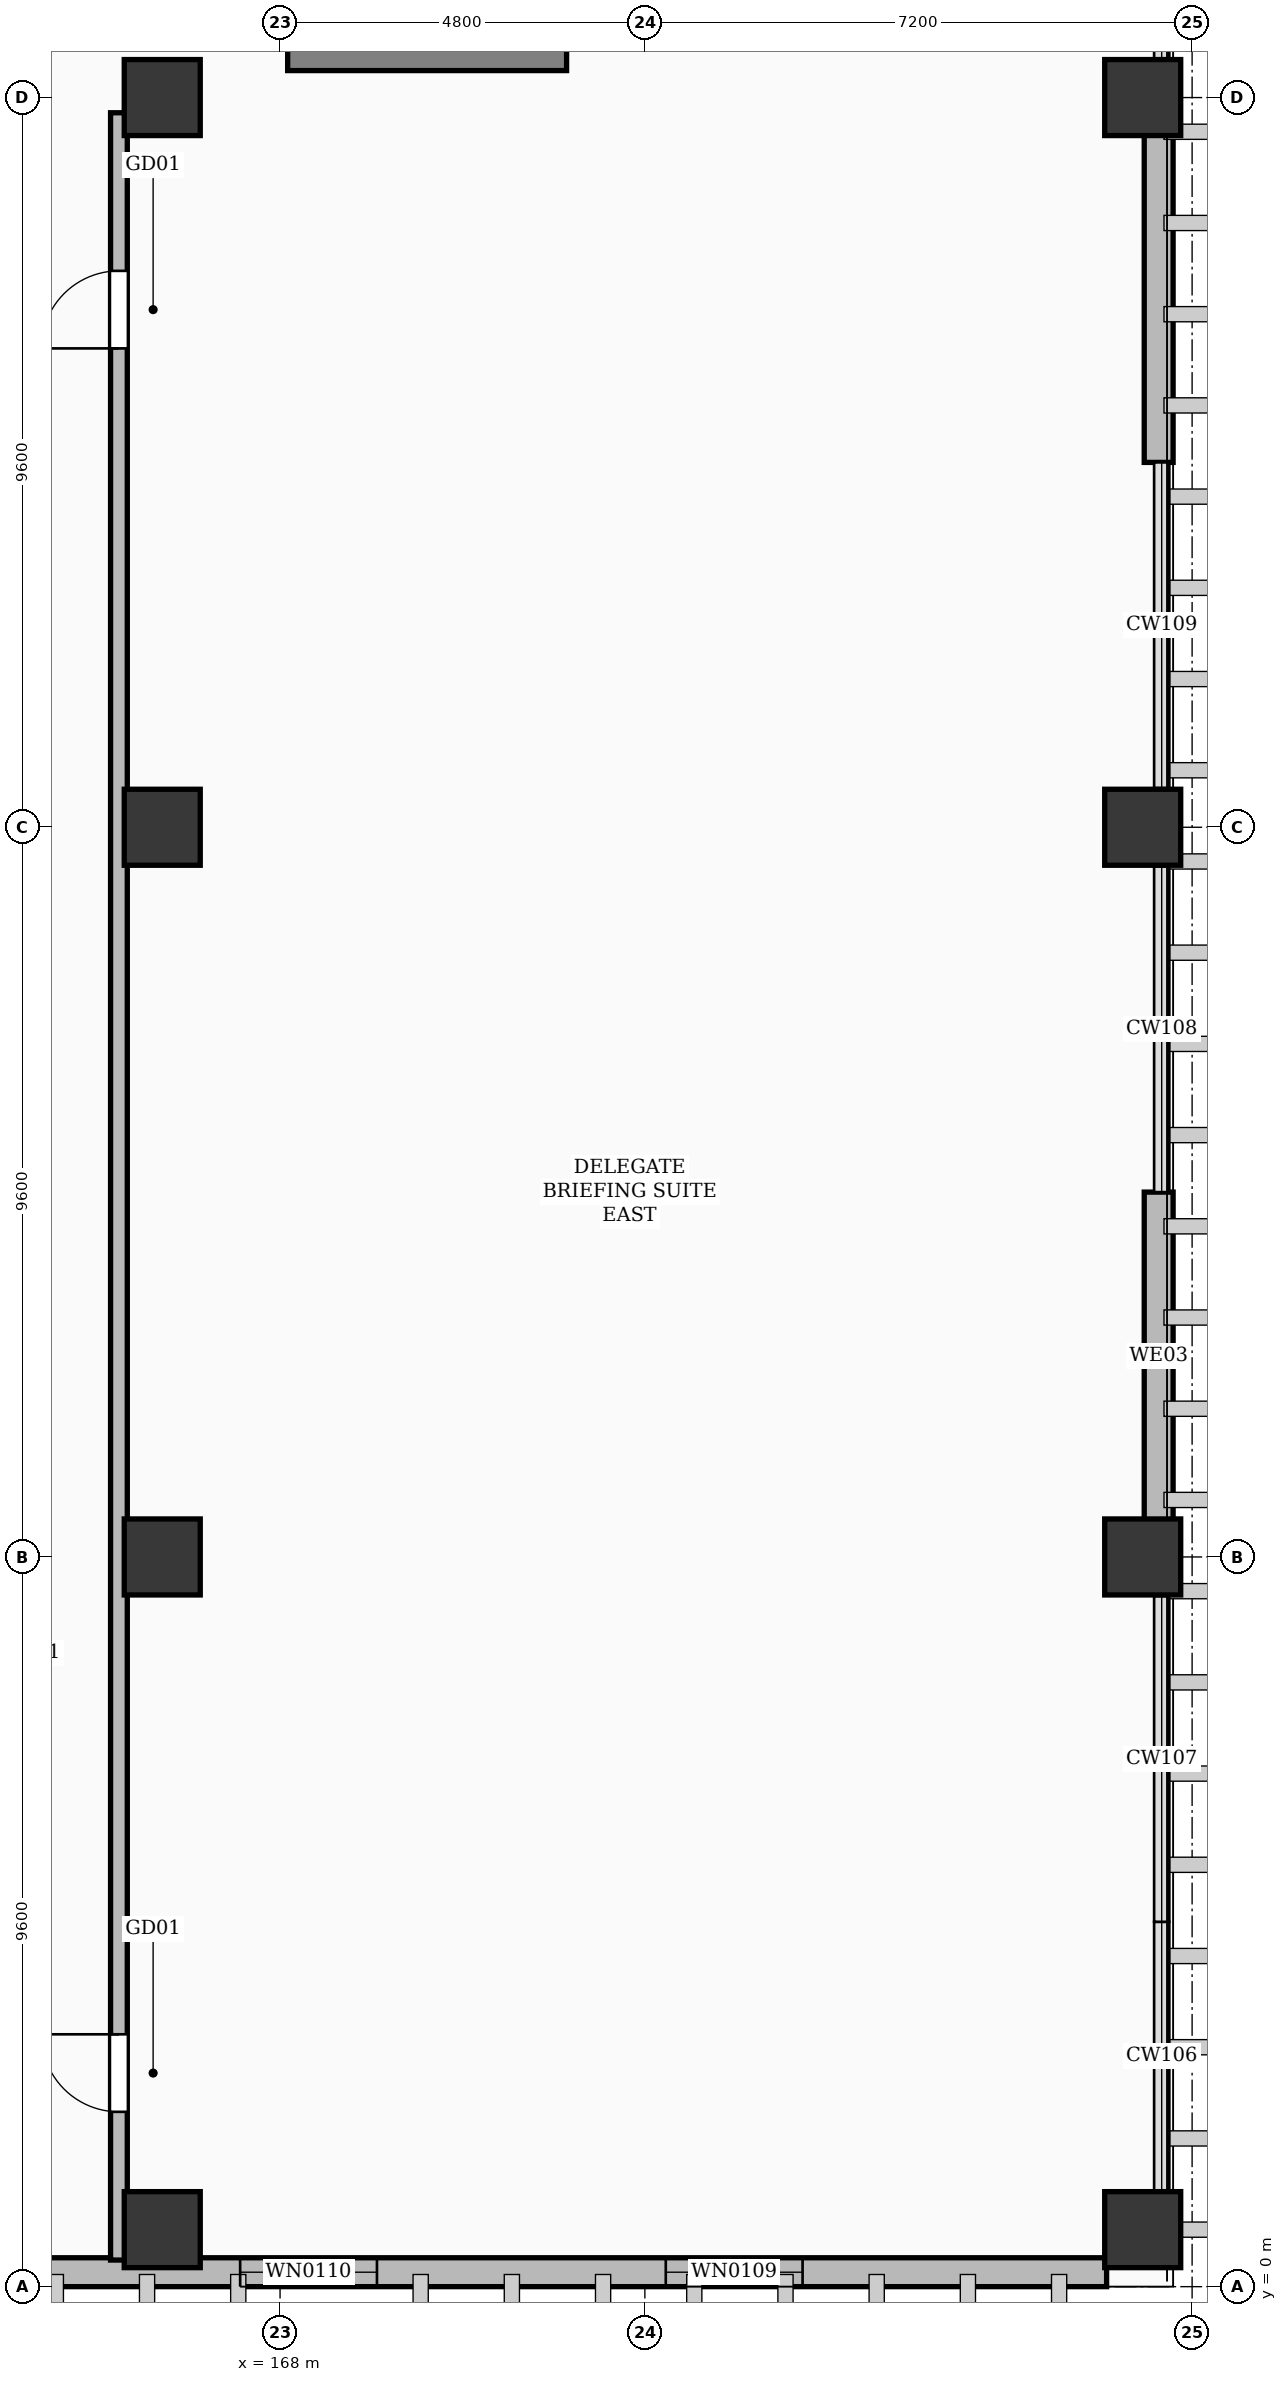
"""IFC4 building model, lengths in metres.
Left out: names, types, materials, properties, quantities, classifications, styles, units other than length and angle.
Written with IfcOpenShell. Run it as: python <this file> out.ifc"""

import sys

from ifc_helpers import new_model, si_unit, direction, frame, frame_2d, origin, origin_2d, place, context, subcontext, project, spatial, rectangle, extrude, element, fill, save


model = new_model("IFC4")
c1 = context("Model", 3, precision=1e-05, world=origin(), true_north=direction((0.0, 1.0)))
c2 = subcontext(c1, "Body", "Model", "MODEL_VIEW")
j1 = project(units=[si_unit("LENGTHUNIT", "METRE"), si_unit("PLANEANGLEUNIT", "RADIAN")], contexts=[c1])
p1 = place(None, origin())
s1 = spatial("IfcSite", under=j1, at=p1, CompositionType="ELEMENT")
p2 = place(p1, origin())
s2 = spatial("IfcBuilding", under=s1, at=p2, CompositionType="ELEMENT")
p3 = place(p2, frame((0.0, 0.0, 6.0)))
s3 = spatial("IfcBuildingStorey", under=s2, at=p3, CompositionType="ELEMENT", Elevation=6.0)
for number, where, z_axis, x_axis in (
    (1, (166.45, 0.75, 0.0), (0.0, 0.0, 1.0), (1.0, 0.0, 0.0)),
    (2, (166.45, 9.6, 0.0), (0.0, 0.0, 1.0), (1.0, 0.0, 0.0)),
    (3, (166.45, 19.2, 0.0), (0.0, 0.0, 1.0), (1.0, 0.0, 0.0)),
    (4, (166.45, 28.8, 0.0), (0.0, 0.0, 1.0), (1.0, 0.0, 0.0)),
    (5, (179.35, 0.75, 0.0), (0.0, 0.0, 1.0), (1.0, 0.0, 0.0)),
    (6, (179.35, 9.6, 0.0), (0.0, 0.0, 1.0), (1.0, 0.0, 0.0)),
    (7, (179.35, 19.2, 0.0), (0.0, 0.0, 1.0), (1.0, 0.0, 0.0)),
    (8, (179.35, 28.8, 0.0), (0.0, 0.0, 1.0), (1.0, 0.0, 0.0)),
):
    element("IfcColumn", number, at=place(p3, frame(where, z_axis=z_axis, x_axis=x_axis)), inside=s3, PredefinedType="COLUMN", context=c2, shape_type="SweptSolid", body=[
        extrude(rectangle(XDim=1.0, YDim=1.0, at=origin_2d()), origin(), (0.0, 0.0, 1.0), 5.4),
    ])
p4 = place(p3, frame((178.875, 0.19, 0.0), z_axis=(0.0, 0.0, 1.0), x_axis=(-1.0, 0.0, 0.0)))
e9 = element("IfcWall", 9, at=p4, inside=s3, PredefinedType="SOLIDWALL", context=c2, shape_type="SweptSolid", body=[
    extrude(rectangle(XDim=28.95, YDim=0.38, at=frame_2d((14.475, 0.0))), origin(), (0.0, 0.0, 1.0), 5.1),
])
p5 = place(p4, frame((4.0, 0.0, 0.55)))
e10 = element("IfcOpeningElement", 10, at=p5, cuts=e9, PredefinedType="OPENING", context=c2, shape_type="SweptSolid", body=[
    extrude(rectangle(XDim=1.8, YDim=1.76, at=frame_2d((0.9, 0.88))), frame((0.0, 0.202, 0.0), z_axis=(0.0, -1.0, 0.0), x_axis=(1.0, 0.0, 0.0)), (0.0, 0.0, 1.0), 0.404),
])
p6 = place(p4, frame((9.6, 0.0, 0.55)))
e11 = element("IfcOpeningElement", 11, at=p6, cuts=e9, PredefinedType="OPENING", context=c2, shape_type="SweptSolid", body=[
    extrude(rectangle(XDim=1.8, YDim=1.76, at=frame_2d((0.9, 0.88))), frame((0.0, 0.202, 0.0), z_axis=(0.0, -1.0, 0.0), x_axis=(1.0, 0.0, 0.0)), (0.0, 0.0, 1.0), 0.404),
])
p7 = place(p4, frame((20.8, 0.0, 0.55)))
e12 = element("IfcOpeningElement", 12, at=p7, cuts=e9, PredefinedType="OPENING", context=c2, shape_type="SweptSolid", body=[
    extrude(rectangle(XDim=1.8, YDim=1.76, at=frame_2d((0.9, 0.88))), frame((0.0, 0.202, 0.0), z_axis=(0.0, -1.0, 0.0), x_axis=(1.0, 0.0, 0.0)), (0.0, 0.0, 1.0), 0.404),
])
p8 = place(p4, frame((25.4, 0.0, 0.55)))
e13 = element("IfcOpeningElement", 13, at=p8, cuts=e9, PredefinedType="OPENING", context=c2, shape_type="SweptSolid", body=[
    extrude(rectangle(XDim=1.8, YDim=1.76, at=frame_2d((0.9, 0.88))), frame((0.0, 0.202, 0.0), z_axis=(0.0, -1.0, 0.0), x_axis=(1.0, 0.0, 0.0)), (0.0, 0.0, 1.0), 0.404),
])
for number, where, z_axis, x_axis in (
    (14, (179.56, 14.4, 0.0), (0.0, 0.0, 1.0), (0.0, -1.0, 0.0)),
    (15, (179.56, 28.325, 0.0), (0.0, 0.0, 1.0), (0.0, -1.0, 0.0)),
):
    element("IfcWall", number, at=place(p3, frame(where, z_axis=z_axis, x_axis=x_axis)), inside=s3, PredefinedType="SOLIDWALL", context=c2, shape_type="SweptSolid", body=[
        extrude(rectangle(XDim=4.325, YDim=0.38, at=frame_2d((2.163, 0.0))), origin(), (0.0, 0.0, 1.0), 4.342),
    ])
p9 = place(p3, frame((168.1, 29.38, 0.0), z_axis=(0.0, 0.0, 1.0), x_axis=(1.0, 0.0, 0.0)))
e16 = element("IfcWall", 16, at=p9, inside=s3, PredefinedType="SHEAR", context=c2, shape_type="SweptSolid", body=[
    extrude(rectangle(XDim=3.67, YDim=0.45, at=frame_2d((1.835, 0.0))), origin(), (0.0, 0.0, 1.0), 5.1),
])
p10 = place(p3, frame((165.88, 0.35, 0.0), z_axis=(0.0, 0.0, 1.0), x_axis=(0.0, 1.0, 0.0)))
e17 = element("IfcWall", 17, at=p10, inside=s3, PredefinedType="PARTITIONING", context=c2, shape_type="SweptSolid", body=[
    extrude(rectangle(XDim=28.25, YDim=0.22, at=frame_2d((14.125, 0.0))), origin(), (0.0, 0.0, 1.0), 4.312),
])
p11 = place(p10, frame((1.95, 0.0, 0.0)))
e18 = element("IfcOpeningElement", 18, at=p11, cuts=e17, PredefinedType="OPENING", context=c2, shape_type="SweptSolid", body=[
    extrude(rectangle(XDim=1.02, YDim=2.2, at=frame_2d((0.51, 1.1))), frame((0.0, 0.122, 0.0), z_axis=(0.0, -1.0, 0.0), x_axis=(1.0, 0.0, 0.0)), (0.0, 0.0, 1.0), 0.244),
])
p12 = place(p10, frame((25.15, 0.0, 0.0)))
e19 = element("IfcOpeningElement", 19, at=p12, cuts=e17, PredefinedType="OPENING", context=c2, shape_type="SweptSolid", body=[
    extrude(rectangle(XDim=1.02, YDim=2.2, at=frame_2d((0.51, 1.1))), frame((0.0, 0.122, 0.0), z_axis=(0.0, -1.0, 0.0), x_axis=(1.0, 0.0, 0.0)), (0.0, 0.0, 1.0), 0.244),
])
p13 = place(p5, origin())
e20 = element("IfcWindow", 20, at=p13, inside=s3, PartitioningType="SINGLE_PANEL", PredefinedType="WINDOW", context=c2, shape_type="SweptSolid", body=[
    extrude(rectangle(XDim=1.8, YDim=1.76, at=frame_2d((0.9, 0.88))), frame((0.0, 0.03, 0.0), z_axis=(0.0, -1.0, 0.0), x_axis=(1.0, 0.0, 0.0)), (0.0, 0.0, 1.0), 0.06),
])
fill(e10, e20)
p14 = place(p6, origin())
e21 = element("IfcWindow", 21, at=p14, inside=s3, PartitioningType="SINGLE_PANEL", PredefinedType="WINDOW", context=c2, shape_type="SweptSolid", body=[
    extrude(rectangle(XDim=1.8, YDim=1.76, at=frame_2d((0.9, 0.88))), frame((0.0, 0.03, 0.0), z_axis=(0.0, -1.0, 0.0), x_axis=(1.0, 0.0, 0.0)), (0.0, 0.0, 1.0), 0.06),
])
fill(e11, e21)
p15 = place(p11, origin())
e22 = element("IfcDoor", 22, at=p15, inside=s3, OperationType="SINGLE_SWING_RIGHT", PredefinedType="DOOR", context=c2, shape_type="SweptSolid", body=[
    extrude(rectangle(XDim=1.02, YDim=2.2, at=frame_2d((0.51, 1.1))), frame((0.0, 0.025, 0.0), z_axis=(0.0, -1.0, 0.0), x_axis=(1.0, 0.0, 0.0)), (0.0, 0.0, 1.0), 0.05),
])
fill(e18, e22)
p16 = place(p12, origin())
e23 = element("IfcDoor", 23, at=p16, inside=s3, OperationType="SINGLE_SWING_LEFT", PredefinedType="DOOR", context=c2, shape_type="SweptSolid", body=[
    extrude(rectangle(XDim=1.02, YDim=2.2, at=frame_2d((0.51, 1.1))), frame((0.0, 0.025, 0.0), z_axis=(0.0, -1.0, 0.0), x_axis=(1.0, 0.0, 0.0)), (0.0, 0.0, 1.0), 0.05),
])
fill(e19, e23)
save(model, sys.argv[1])
